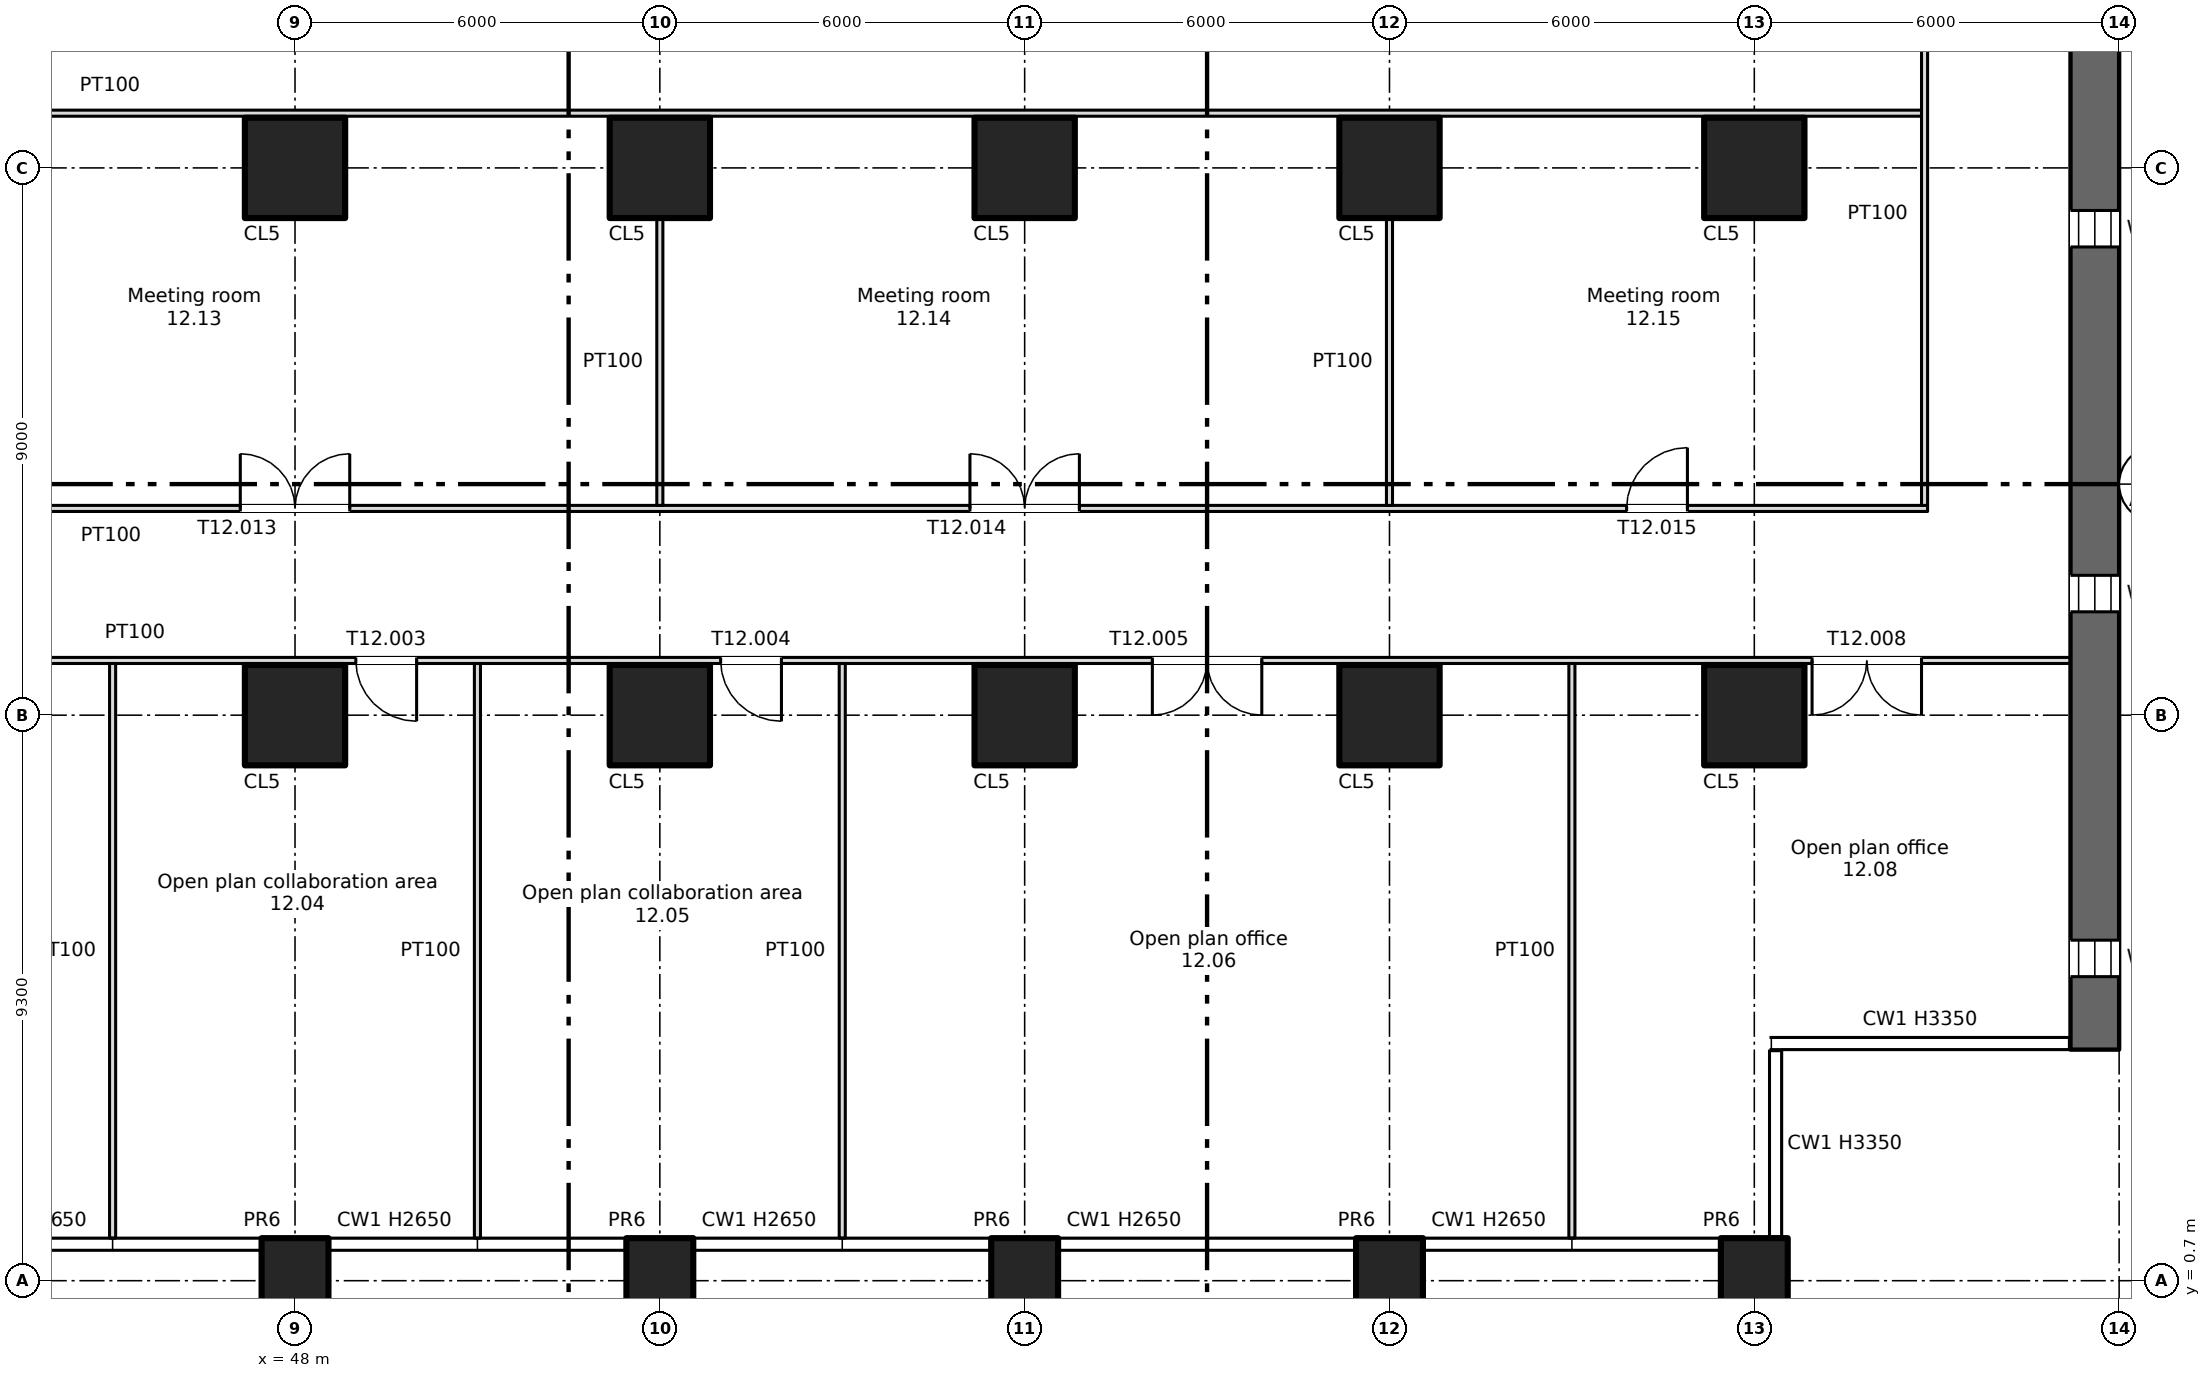
"""IFC4 building model, lengths in metres.
Left out: names, types, materials, properties, quantities, classifications, styles, units other than length and angle.
Written with IfcOpenShell. Run it as: python <this file> out.ifc"""

import sys

from ifc_helpers import new_model, si_unit, direction, frame, frame_2d, origin, origin_2d, place, context, subcontext, project, spatial, rectangle, extrude, element, fill, save


model = new_model("IFC4")
c1 = context("Model", 3, precision=1e-05, world=origin(), true_north=direction((0.0, 1.0)))
c2 = subcontext(c1, "Body", "Model", "MODEL_VIEW")
j1 = project(units=[si_unit("LENGTHUNIT", "METRE"), si_unit("PLANEANGLEUNIT", "RADIAN")], contexts=[c1])
p1 = place(None, origin())
s1 = spatial("IfcSite", under=j1, at=p1, CompositionType="ELEMENT")
p2 = place(p1, origin())
s2 = spatial("IfcBuilding", under=s1, at=p2, CompositionType="ELEMENT")
p3 = place(p2, frame((0.0, 0.0, 60.0)))
s3 = spatial("IfcBuildingStorey", under=s2, at=p3, CompositionType="ELEMENT", Elevation=60.0)
for number, where, z_axis, x_axis in (
    (1, (48.0, 0.7, -0.4), (0.0, 0.0, 1.0), (1.0, 0.0, 0.0)),
    (2, (54.0, 0.7, -0.4), (0.0, 0.0, 1.0), (1.0, 0.0, 0.0)),
    (3, (60.0, 0.7, -0.4), (0.0, 0.0, 1.0), (1.0, 0.0, 0.0)),
    (4, (66.0, 0.7, -0.4), (0.0, 0.0, 1.0), (1.0, 0.0, 0.0)),
    (5, (72.0, 0.7, -0.4), (0.0, 0.0, 1.0), (1.0, 0.0, 0.0)),
):
    element("IfcColumn", number, at=place(p3, frame(where, z_axis=z_axis, x_axis=x_axis)), inside=s3, PredefinedType="COLUMN", context=c2, shape_type="SweptSolid", body=[
        extrude(rectangle(XDim=1.1, YDim=1.4, at=origin_2d()), origin(), (0.0, 0.0, 1.0), 3.75),
    ])
for number, where, z_axis, x_axis in (
    (6, (48.0, 10.0, 0.0), (0.0, 0.0, 1.0), (1.0, 0.0, 0.0)),
    (7, (48.0, 19.0, 0.0), (0.0, 0.0, 1.0), (1.0, 0.0, 0.0)),
    (8, (54.0, 10.0, 0.0), (0.0, 0.0, 1.0), (1.0, 0.0, 0.0)),
    (9, (54.0, 19.0, 0.0), (0.0, 0.0, 1.0), (1.0, 0.0, 0.0)),
    (10, (60.0, 10.0, 0.0), (0.0, 0.0, 1.0), (1.0, 0.0, 0.0)),
    (11, (60.0, 19.0, 0.0), (0.0, 0.0, 1.0), (1.0, 0.0, 0.0)),
    (12, (66.0, 10.0, 0.0), (0.0, 0.0, 1.0), (1.0, 0.0, 0.0)),
    (13, (66.0, 19.0, 0.0), (0.0, 0.0, 1.0), (1.0, 0.0, 0.0)),
    (14, (72.0, 10.0, 0.0), (0.0, 0.0, 1.0), (1.0, 0.0, 0.0)),
    (15, (72.0, 19.0, 0.0), (0.0, 0.0, 1.0), (1.0, 0.0, 0.0)),
):
    element("IfcColumn", number, at=place(p3, frame(where, z_axis=z_axis, x_axis=x_axis)), inside=s3, PredefinedType="COLUMN", context=c2, shape_type="SweptSolid", body=[
        extrude(rectangle(XDim=1.65, YDim=1.65, at=origin_2d()), origin(), (0.0, 0.0, 1.0), 3.35),
    ])
p4 = place(p3, frame((77.6, 4.5, 0.0), z_axis=(0.0, 0.0, 1.0), x_axis=(0.0, 1.0, 0.0)))
e16 = element("IfcWall", 16, at=p4, inside=s3, PredefinedType="SHEAR", context=c2, shape_type="SweptSolid", body=[
    extrude(rectangle(XDim=37.0, YDim=0.8, at=frame_2d((18.5, 0.0))), origin(), (0.0, 0.0, 1.0), 3.35),
])
p5 = place(p4, frame((1.2, 0.0, 0.6)))
e17 = element("IfcOpeningElement", 17, at=p5, cuts=e16, PredefinedType="OPENING", context=c2, shape_type="SweptSolid", body=[
    extrude(rectangle(XDim=0.6, YDim=2.4, at=frame_2d((0.3, 1.2))), frame((0.0, 0.41, 0.0), z_axis=(0.0, -1.0, 0.0), x_axis=(1.0, 0.0, 0.0)), (0.0, 0.0, 1.0), 0.82),
])
p6 = place(p4, frame((7.2, 0.0, 0.6)))
e18 = element("IfcOpeningElement", 18, at=p6, cuts=e16, PredefinedType="OPENING", context=c2, shape_type="SweptSolid", body=[
    extrude(rectangle(XDim=0.6, YDim=2.4, at=frame_2d((0.3, 1.2))), frame((0.0, 0.41, 0.0), z_axis=(0.0, -1.0, 0.0), x_axis=(1.0, 0.0, 0.0)), (0.0, 0.0, 1.0), 0.82),
])
p7 = place(p4, frame((13.2, 0.0, 0.6)))
e19 = element("IfcOpeningElement", 19, at=p7, cuts=e16, PredefinedType="OPENING", context=c2, shape_type="SweptSolid", body=[
    extrude(rectangle(XDim=0.6, YDim=2.4, at=frame_2d((0.3, 1.2))), frame((0.0, 0.41, 0.0), z_axis=(0.0, -1.0, 0.0), x_axis=(1.0, 0.0, 0.0)), (0.0, 0.0, 1.0), 0.82),
])
p8 = place(p4, frame((19.2, 0.0, 0.6)))
e20 = element("IfcOpeningElement", 20, at=p8, cuts=e16, PredefinedType="OPENING", context=c2, shape_type="SweptSolid", body=[
    extrude(rectangle(XDim=0.6, YDim=2.4, at=frame_2d((0.3, 1.2))), frame((0.0, 0.41, 0.0), z_axis=(0.0, -1.0, 0.0), x_axis=(1.0, 0.0, 0.0)), (0.0, 0.0, 1.0), 0.82),
])
p9 = place(p4, frame((25.2, 0.0, 0.6)))
e21 = element("IfcOpeningElement", 21, at=p9, cuts=e16, PredefinedType="OPENING", context=c2, shape_type="SweptSolid", body=[
    extrude(rectangle(XDim=0.6, YDim=2.4, at=frame_2d((0.3, 1.2))), frame((0.0, 0.41, 0.0), z_axis=(0.0, -1.0, 0.0), x_axis=(1.0, 0.0, 0.0)), (0.0, 0.0, 1.0), 0.82),
])
p10 = place(p4, frame((31.2, 0.0, 0.6)))
e22 = element("IfcOpeningElement", 22, at=p10, cuts=e16, PredefinedType="OPENING", context=c2, shape_type="SweptSolid", body=[
    extrude(rectangle(XDim=0.6, YDim=2.4, at=frame_2d((0.3, 1.2))), frame((0.0, 0.41, 0.0), z_axis=(0.0, -1.0, 0.0), x_axis=(1.0, 0.0, 0.0)), (0.0, 0.0, 1.0), 0.82),
])
p11 = place(p3, frame((0.8, 10.9, 0.0), z_axis=(0.0, 0.0, 1.0), x_axis=(1.0, 0.0, 0.0)))
e23 = element("IfcWall", 23, at=p11, inside=s3, PredefinedType="PARTITIONING", context=c2, shape_type="SweptSolid", body=[
    extrude(rectangle(XDim=76.4, YDim=0.1, at=frame_2d((38.2, 0.0))), origin(), (0.0, 0.0, 1.0), 3.35),
])
p12 = place(p11, frame((25.3, 0.0, 0.0)))
e24 = element("IfcOpeningElement", 24, at=p12, cuts=e23, PredefinedType="OPENING", context=c2, shape_type="SweptSolid", body=[
    extrude(rectangle(XDim=1.8, YDim=2.1, at=frame_2d((0.9, 1.05))), frame((0.0, 0.06, 0.0), z_axis=(0.0, -1.0, 0.0), x_axis=(1.0, 0.0, 0.0)), (0.0, 0.0, 1.0), 0.12),
])
p13 = place(p11, frame((37.3, 0.0, 0.0)))
e25 = element("IfcOpeningElement", 25, at=p13, cuts=e23, PredefinedType="OPENING", context=c2, shape_type="SweptSolid", body=[
    extrude(rectangle(XDim=1.8, YDim=2.1, at=frame_2d((0.9, 1.05))), frame((0.0, 0.06, 0.0), z_axis=(0.0, -1.0, 0.0), x_axis=(1.0, 0.0, 0.0)), (0.0, 0.0, 1.0), 0.12),
])
p14 = place(p11, frame((48.2, 0.0, 0.0)))
e26 = element("IfcOpeningElement", 26, at=p14, cuts=e23, PredefinedType="OPENING", context=c2, shape_type="SweptSolid", body=[
    extrude(rectangle(XDim=1.0, YDim=2.1, at=frame_2d((0.5, 1.05))), frame((0.0, 0.06, 0.0), z_axis=(0.0, -1.0, 0.0), x_axis=(1.0, 0.0, 0.0)), (0.0, 0.0, 1.0), 0.12),
])
p15 = place(p11, frame((54.2, 0.0, 0.0)))
e27 = element("IfcOpeningElement", 27, at=p15, cuts=e23, PredefinedType="OPENING", context=c2, shape_type="SweptSolid", body=[
    extrude(rectangle(XDim=1.0, YDim=2.1, at=frame_2d((0.5, 1.05))), frame((0.0, 0.06, 0.0), z_axis=(0.0, -1.0, 0.0), x_axis=(1.0, 0.0, 0.0)), (0.0, 0.0, 1.0), 0.12),
])
p16 = place(p11, frame((61.3, 0.0, 0.0)))
e28 = element("IfcOpeningElement", 28, at=p16, cuts=e23, PredefinedType="OPENING", context=c2, shape_type="SweptSolid", body=[
    extrude(rectangle(XDim=1.8, YDim=2.1, at=frame_2d((0.9, 1.05))), frame((0.0, 0.06, 0.0), z_axis=(0.0, -1.0, 0.0), x_axis=(1.0, 0.0, 0.0)), (0.0, 0.0, 1.0), 0.12),
])
p17 = place(p11, frame((2.95, 0.0, 0.0)))
e29 = element("IfcOpeningElement", 29, at=p17, cuts=e23, PredefinedType="OPENING", context=c2, shape_type="SweptSolid", body=[
    extrude(rectangle(XDim=1.2, YDim=2.1, at=frame_2d((0.6, 1.05))), frame((0.0, 0.06, 0.0), z_axis=(0.0, -1.0, 0.0), x_axis=(1.0, 0.0, 0.0)), (0.0, 0.0, 1.0), 0.12),
])
p18 = place(p11, frame((14.55, 0.0, 0.0)))
e30 = element("IfcOpeningElement", 30, at=p18, cuts=e23, PredefinedType="OPENING", context=c2, shape_type="SweptSolid", body=[
    extrude(rectangle(XDim=1.2, YDim=2.1, at=frame_2d((0.6, 1.05))), frame((0.0, 0.06, 0.0), z_axis=(0.0, -1.0, 0.0), x_axis=(1.0, 0.0, 0.0)), (0.0, 0.0, 1.0), 0.12),
])
p19 = place(p11, frame((72.15, 0.0, 0.0)))
e31 = element("IfcOpeningElement", 31, at=p19, cuts=e23, PredefinedType="OPENING", context=c2, shape_type="SweptSolid", body=[
    extrude(rectangle(XDim=1.8, YDim=2.1, at=frame_2d((0.9, 1.05))), frame((0.0, 0.06, 0.0), z_axis=(0.0, -1.0, 0.0), x_axis=(1.0, 0.0, 0.0)), (0.0, 0.0, 1.0), 0.12),
])
p20 = place(p3, frame((3.15, 13.4, 0.0), z_axis=(0.0, 0.0, 1.0), x_axis=(1.0, 0.0, 0.0)))
e32 = element("IfcWall", 32, at=p20, inside=s3, PredefinedType="PARTITIONING", context=c2, shape_type="SweptSolid", body=[
    extrude(rectangle(XDim=71.7, YDim=0.1, at=frame_2d((35.85, 0.0))), origin(), (0.0, 0.0, 1.0), 3.35),
])
p21 = place(p20, frame((9.85, 0.0, 0.0)))
e33 = element("IfcOpeningElement", 33, at=p21, cuts=e32, PredefinedType="OPENING", context=c2, shape_type="SweptSolid", body=[
    extrude(rectangle(XDim=1.0, YDim=2.1, at=frame_2d((0.5, 1.05))), frame((0.0, 0.06, 0.0), z_axis=(0.0, -1.0, 0.0), x_axis=(1.0, 0.0, 0.0)), (0.0, 0.0, 1.0), 0.12),
])
p22 = place(p20, frame((19.95, 0.0, 0.0)))
e34 = element("IfcOpeningElement", 34, at=p22, cuts=e32, PredefinedType="OPENING", context=c2, shape_type="SweptSolid", body=[
    extrude(rectangle(XDim=1.8, YDim=2.1, at=frame_2d((0.9, 1.05))), frame((0.0, 0.06, 0.0), z_axis=(0.0, -1.0, 0.0), x_axis=(1.0, 0.0, 0.0)), (0.0, 0.0, 1.0), 0.12),
])
p23 = place(p20, frame((31.95, 0.0, 0.0)))
e35 = element("IfcOpeningElement", 35, at=p23, cuts=e32, PredefinedType="OPENING", context=c2, shape_type="SweptSolid", body=[
    extrude(rectangle(XDim=1.8, YDim=2.1, at=frame_2d((0.9, 1.05))), frame((0.0, 0.06, 0.0), z_axis=(0.0, -1.0, 0.0), x_axis=(1.0, 0.0, 0.0)), (0.0, 0.0, 1.0), 0.12),
])
p24 = place(p20, frame((43.95, 0.0, 0.0)))
e36 = element("IfcOpeningElement", 36, at=p24, cuts=e32, PredefinedType="OPENING", context=c2, shape_type="SweptSolid", body=[
    extrude(rectangle(XDim=1.8, YDim=2.1, at=frame_2d((0.9, 1.05))), frame((0.0, 0.06, 0.0), z_axis=(0.0, -1.0, 0.0), x_axis=(1.0, 0.0, 0.0)), (0.0, 0.0, 1.0), 0.12),
])
p25 = place(p20, frame((55.95, 0.0, 0.0)))
e37 = element("IfcOpeningElement", 37, at=p25, cuts=e32, PredefinedType="OPENING", context=c2, shape_type="SweptSolid", body=[
    extrude(rectangle(XDim=1.8, YDim=2.1, at=frame_2d((0.9, 1.05))), frame((0.0, 0.06, 0.0), z_axis=(0.0, -1.0, 0.0), x_axis=(1.0, 0.0, 0.0)), (0.0, 0.0, 1.0), 0.12),
])
p26 = place(p20, frame((66.75, 0.0, 0.0)))
e38 = element("IfcOpeningElement", 38, at=p26, cuts=e32, PredefinedType="OPENING", context=c2, shape_type="SweptSolid", body=[
    extrude(rectangle(XDim=1.0, YDim=2.1, at=frame_2d((0.5, 1.05))), frame((0.0, 0.06, 0.0), z_axis=(0.0, -1.0, 0.0), x_axis=(1.0, 0.0, 0.0)), (0.0, 0.0, 1.0), 0.12),
])
p27 = place(p3, frame((3.25, 19.9, 0.0), z_axis=(0.0, 0.0, 1.0), x_axis=(1.0, 0.0, 0.0)))
e39 = element("IfcWall", 39, at=p27, inside=s3, PredefinedType="PARTITIONING", context=c2, shape_type="SweptSolid", body=[
    extrude(rectangle(XDim=71.5, YDim=0.1, at=frame_2d((35.75, 0.0))), origin(), (0.0, 0.0, 1.0), 3.35),
])
for number, where, z_axis, x_axis in (
    (40, (45.0, 1.4, 0.0), (0.0, 0.0, 1.0), (0.0, 1.0, 0.0)),
    (41, (51.0, 1.4, 0.0), (0.0, 0.0, 1.0), (0.0, 1.0, 0.0)),
):
    element("IfcWall", number, at=place(p3, frame(where, z_axis=z_axis, x_axis=x_axis)), inside=s3, PredefinedType="PARTITIONING", context=c2, shape_type="SweptSolid", body=[
        extrude(rectangle(XDim=9.45, YDim=0.1, at=frame_2d((4.725, 0.0))), origin(), (0.0, 0.0, 1.0), 3.35),
    ])
p28 = place(p3, frame((54.0, 13.45, 0.0), z_axis=(0.0, 0.0, 1.0), x_axis=(0.0, 1.0, 0.0)))
e42 = element("IfcWall", 42, at=p28, inside=s3, PredefinedType="PARTITIONING", context=c2, shape_type="SweptSolid", body=[
    extrude(rectangle(XDim=4.725, YDim=0.1, at=frame_2d((2.363, 0.0))), origin(), (0.0, 0.0, 1.0), 3.35),
])
p29 = place(p3, frame((57.0, 1.4, 0.0), z_axis=(0.0, 0.0, 1.0), x_axis=(0.0, 1.0, 0.0)))
e43 = element("IfcWall", 43, at=p29, inside=s3, PredefinedType="PARTITIONING", context=c2, shape_type="SweptSolid", body=[
    extrude(rectangle(XDim=9.45, YDim=0.1, at=frame_2d((4.725, 0.0))), origin(), (0.0, 0.0, 1.0), 3.35),
])
p30 = place(p3, frame((66.0, 13.45, 0.0), z_axis=(0.0, 0.0, 1.0), x_axis=(0.0, 1.0, 0.0)))
e44 = element("IfcWall", 44, at=p30, inside=s3, PredefinedType="PARTITIONING", context=c2, shape_type="SweptSolid", body=[
    extrude(rectangle(XDim=4.725, YDim=0.1, at=frame_2d((2.363, 0.0))), origin(), (0.0, 0.0, 1.0), 3.35),
])
p31 = place(p3, frame((69.0, 1.4, 0.0), z_axis=(0.0, 0.0, 1.0), x_axis=(0.0, 1.0, 0.0)))
e45 = element("IfcWall", 45, at=p31, inside=s3, PredefinedType="PARTITIONING", context=c2, shape_type="SweptSolid", body=[
    extrude(rectangle(XDim=9.45, YDim=0.1, at=frame_2d((4.725, 0.0))), origin(), (0.0, 0.0, 1.0), 3.35),
])
p32 = place(p3, frame((74.8, 13.45, 0.0), z_axis=(0.0, 0.0, 1.0), x_axis=(0.0, 1.0, 0.0)))
e46 = element("IfcWall", 46, at=p32, inside=s3, PredefinedType="PARTITIONING", context=c2, shape_type="SweptSolid", body=[
    extrude(rectangle(XDim=11.5, YDim=0.1, at=frame_2d((5.75, 0.0))), origin(), (0.0, 0.0, 1.0), 3.35),
])
p33 = place(p5, origin())
e47 = element("IfcWindow", 47, at=p33, inside=s3, PartitioningType="SINGLE_PANEL", PredefinedType="WINDOW", context=c2, shape_type="SweptSolid", body=[
    extrude(rectangle(XDim=0.6, YDim=2.4, at=frame_2d((0.3, 1.2))), frame((0.0, 0.03, 0.0), z_axis=(0.0, -1.0, 0.0), x_axis=(1.0, 0.0, 0.0)), (0.0, 0.0, 1.0), 0.06),
])
fill(e17, e47)
p34 = place(p6, origin())
e48 = element("IfcWindow", 48, at=p34, inside=s3, PartitioningType="SINGLE_PANEL", PredefinedType="WINDOW", context=c2, shape_type="SweptSolid", body=[
    extrude(rectangle(XDim=0.6, YDim=2.4, at=frame_2d((0.3, 1.2))), frame((0.0, 0.03, 0.0), z_axis=(0.0, -1.0, 0.0), x_axis=(1.0, 0.0, 0.0)), (0.0, 0.0, 1.0), 0.06),
])
fill(e18, e48)
p35 = place(p7, origin())
e49 = element("IfcWindow", 49, at=p35, inside=s3, PartitioningType="SINGLE_PANEL", PredefinedType="WINDOW", context=c2, shape_type="SweptSolid", body=[
    extrude(rectangle(XDim=0.6, YDim=2.4, at=frame_2d((0.3, 1.2))), frame((0.0, 0.03, 0.0), z_axis=(0.0, -1.0, 0.0), x_axis=(1.0, 0.0, 0.0)), (0.0, 0.0, 1.0), 0.06),
])
fill(e19, e49)
p36 = place(p14, origin())
e50 = element("IfcDoor", 50, at=p36, inside=s3, OperationType="SINGLE_SWING_RIGHT", PredefinedType="DOOR", context=c2, shape_type="SweptSolid", body=[
    extrude(rectangle(XDim=1.0, YDim=2.1, at=frame_2d((0.5, 1.05))), frame((0.0, 0.025, 0.0), z_axis=(0.0, -1.0, 0.0), x_axis=(1.0, 0.0, 0.0)), (0.0, 0.0, 1.0), 0.05),
])
fill(e26, e50)
p37 = place(p15, origin())
e51 = element("IfcDoor", 51, at=p37, inside=s3, OperationType="SINGLE_SWING_RIGHT", PredefinedType="DOOR", context=c2, shape_type="SweptSolid", body=[
    extrude(rectangle(XDim=1.0, YDim=2.1, at=frame_2d((0.5, 1.05))), frame((0.0, 0.025, 0.0), z_axis=(0.0, -1.0, 0.0), x_axis=(1.0, 0.0, 0.0)), (0.0, 0.0, 1.0), 0.05),
])
fill(e27, e51)
p38 = place(p16, origin())
e52 = element("IfcDoor", 52, at=p38, inside=s3, OperationType="DOUBLE_DOOR_SINGLE_SWING", PredefinedType="DOOR", context=c2, shape_type="SweptSolid", body=[
    extrude(rectangle(XDim=1.8, YDim=2.1, at=frame_2d((0.9, 1.05))), frame((0.0, 0.025, 0.0), z_axis=(0.0, -1.0, 0.0), x_axis=(1.0, 0.0, 0.0)), (0.0, 0.0, 1.0), 0.05),
])
fill(e28, e52)
p39 = place(p19, origin())
e53 = element("IfcDoor", 53, at=p39, inside=s3, OperationType="DOUBLE_DOOR_SINGLE_SWING", PredefinedType="DOOR", context=c2, shape_type="SweptSolid", body=[
    extrude(rectangle(XDim=1.8, YDim=2.1, at=frame_2d((0.9, 1.05))), frame((0.0, 0.025, 0.0), z_axis=(0.0, -1.0, 0.0), x_axis=(1.0, 0.0, 0.0)), (0.0, 0.0, 1.0), 0.05),
])
fill(e31, e53)
p40 = place(p24, origin())
e54 = element("IfcDoor", 54, at=p40, inside=s3, OperationType="DOUBLE_DOOR_SINGLE_SWING", PredefinedType="DOOR", context=c2, shape_type="SweptSolid", body=[
    extrude(rectangle(XDim=1.8, YDim=2.1, at=frame_2d((0.9, 1.05))), frame((0.0, 0.025, 0.0), z_axis=(0.0, -1.0, 0.0), x_axis=(1.0, 0.0, 0.0)), (0.0, 0.0, 1.0), 0.05),
])
fill(e36, e54)
p41 = place(p25, origin())
e55 = element("IfcDoor", 55, at=p41, inside=s3, OperationType="DOUBLE_DOOR_SINGLE_SWING", PredefinedType="DOOR", context=c2, shape_type="SweptSolid", body=[
    extrude(rectangle(XDim=1.8, YDim=2.1, at=frame_2d((0.9, 1.05))), frame((0.0, 0.025, 0.0), z_axis=(0.0, -1.0, 0.0), x_axis=(1.0, 0.0, 0.0)), (0.0, 0.0, 1.0), 0.05),
])
fill(e37, e55)
p42 = place(p26, origin())
e56 = element("IfcDoor", 56, at=p42, inside=s3, OperationType="SINGLE_SWING_RIGHT", PredefinedType="DOOR", context=c2, shape_type="SweptSolid", body=[
    extrude(rectangle(XDim=1.0, YDim=2.1, at=frame_2d((0.5, 1.05))), frame((0.0, 0.025, 0.0), z_axis=(0.0, -1.0, 0.0), x_axis=(1.0, 0.0, 0.0)), (0.0, 0.0, 1.0), 0.05),
])
fill(e38, e56)
save(model, sys.argv[1])
